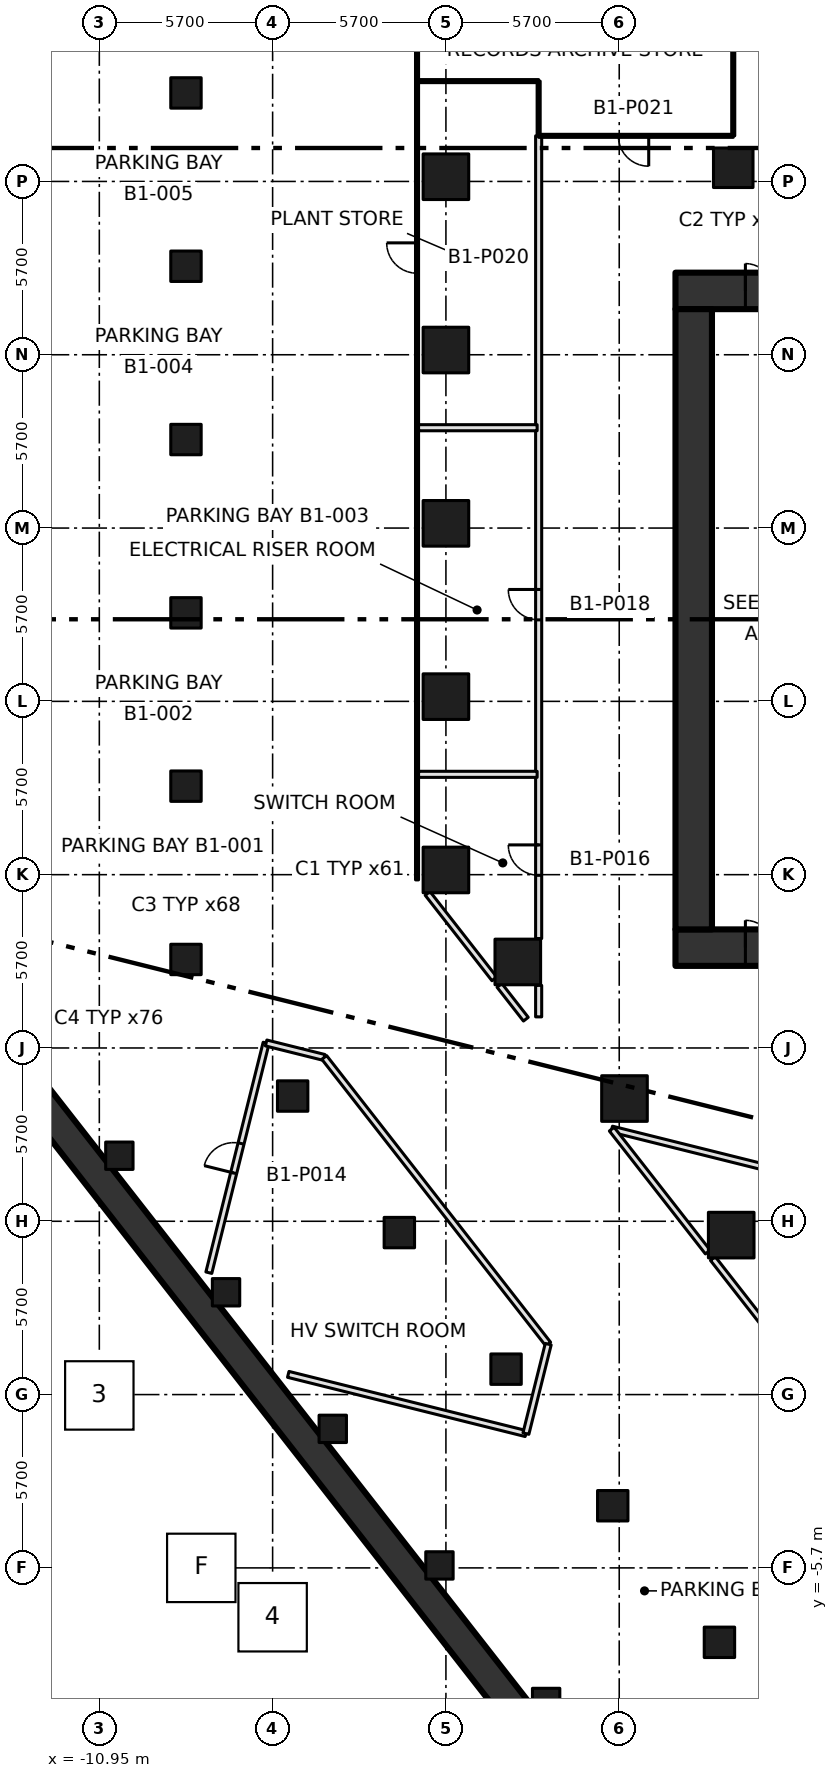
"""IFC4 building model, lengths in metres.
Left out: names, types, materials, properties, quantities, classifications, styles, units other than length and angle.
Written with IfcOpenShell. Run it as: python <this file> out.ifc"""

import sys

from ifc_helpers import new_model, si_unit, direction, frame, frame_2d, origin, origin_2d, place, context, subcontext, project, spatial, rectangle, extrude, element, fill, save


model = new_model("IFC4")
c1 = context("Model", 3, precision=1e-05, world=origin(), true_north=direction((0.0, 1.0)))
c2 = subcontext(c1, "Body", "Model", "MODEL_VIEW")
j1 = project(units=[si_unit("LENGTHUNIT", "METRE"), si_unit("PLANEANGLEUNIT", "RADIAN")], contexts=[c1])
p1 = place(None, origin())
s1 = spatial("IfcSite", under=j1, at=p1, CompositionType="ELEMENT")
p2 = place(p1, origin())
s2 = spatial("IfcBuilding", under=s1, at=p2, CompositionType="ELEMENT")
p3 = place(p2, frame((0.0, 0.0, -4.5)))
s3 = spatial("IfcBuildingStorey", under=s2, at=p3, CompositionType="ELEMENT", Elevation=-4.5)
p4 = place(p3, frame((8.202, -17.356, 0.0), z_axis=(0.0, 0.0, 1.0), x_axis=(-0.615661751898, 0.788010537524, 0.0)))
e1 = element("IfcWall", 1, at=p4, inside=s3, PredefinedType="SOLIDWALL", context=c2, shape_type="SweptSolid", body=[
    extrude(rectangle(XDim=37.452, YDim=1.0, at=frame_2d((18.726, 0.0))), origin(), (0.0, 0.0, 1.0), 4.5),
])
for number, where, z_axis, x_axis in (
    (2, (0.45, 17.255, 0.0), (0.0, 0.0, 1.0), (1.0, 0.0, 0.0)),
    (3, (0.45, 22.955, 0.0), (0.0, 0.0, 1.0), (1.0, 0.0, 0.0)),
    (4, (0.45, 28.655, 0.0), (0.0, 0.0, 1.0), (1.0, 0.0, 0.0)),
    (5, (0.45, 34.355, 0.0), (0.0, 0.0, 1.0), (1.0, 0.0, 0.0)),
    (6, (0.45, 40.055, 0.0), (0.0, 0.0, 1.0), (1.0, 0.0, 0.0)),
    (7, (9.833, 5.245, 0.0), (0.0, 0.0, 1.0), (1.0, 0.0, 0.0)),
    (8, (6.323, 9.737, 0.0), (0.0, 0.0, 1.0), (1.0, 0.0, 0.0)),
    (9, (2.814, 14.229, 0.0), (0.0, 0.0, 1.0), (1.0, 0.0, 0.0)),
):
    element("IfcColumn", number, at=place(p3, frame(where, z_axis=z_axis, x_axis=x_axis)), inside=s3, PredefinedType="COLUMN", context=c2, shape_type="SweptSolid", body=[
        extrude(rectangle(XDim=1.5, YDim=1.5, at=origin_2d()), origin(), (0.0, 0.0, 1.0), 4.5),
    ])
p5 = place(p3, frame((9.9, 40.35, 0.0), z_axis=(0.0, 0.0, 1.0), x_axis=(1.0, 0.0, 0.0)))
e10 = element("IfcColumn", 10, at=p5, inside=s3, PredefinedType="COLUMN", context=c2, shape_type="SweptSolid", body=[
    extrude(rectangle(XDim=1.3, YDim=1.3, at=origin_2d()), origin(), (0.0, 0.0, 1.0), 4.5),
])
for number, where, z_axis, x_axis in (
    (11, (-8.1, 14.311, 0.0), (0.0, 0.0, 1.0), (1.0, 0.0, 0.0)),
    (12, (-8.1, 20.011, 0.0), (0.0, 0.0, 1.0), (1.0, 0.0, 0.0)),
    (13, (-8.1, 25.711, 0.0), (0.0, 0.0, 1.0), (1.0, 0.0, 0.0)),
    (14, (-8.1, 31.411, 0.0), (0.0, 0.0, 1.0), (1.0, 0.0, 0.0)),
    (15, (-8.1, 37.111, 0.0), (0.0, 0.0, 1.0), (1.0, 0.0, 0.0)),
    (16, (-8.1, 42.811, 0.0), (0.0, 0.0, 1.0), (1.0, 0.0, 0.0)),
    (17, (-4.591, 9.819, 0.0), (0.0, 0.0, 1.0), (1.0, 0.0, 0.0)),
    (18, (-1.082, 5.328, 0.0), (0.0, 0.0, 1.0), (1.0, 0.0, 0.0)),
    (19, (2.428, 0.836, 0.0), (0.0, 0.0, 1.0), (1.0, 0.0, 0.0)),
    (20, (5.937, -3.656, 0.0), (0.0, 0.0, 1.0), (1.0, 0.0, 0.0)),
    (21, (9.446, -8.148, 0.0), (0.0, 0.0, 1.0), (1.0, 0.0, 0.0)),
):
    element("IfcColumn", number, at=place(p3, frame(where, z_axis=z_axis, x_axis=x_axis)), inside=s3, PredefinedType="COLUMN", context=c2, shape_type="SweptSolid", body=[
        extrude(rectangle(XDim=1.0, YDim=1.0, at=origin_2d()), origin(), (0.0, 0.0, 1.0), 4.5),
    ])
for number, where, z_axis, x_axis in (
    (22, (-10.291, 7.856, 0.0), (0.0, 0.0, 1.0), (1.0, 0.0, 0.0)),
    (23, (-6.782, 3.365, 0.0), (0.0, 0.0, 1.0), (1.0, 0.0, 0.0)),
    (24, (-3.272, -1.127, 0.0), (0.0, 0.0, 1.0), (1.0, 0.0, 0.0)),
    (25, (0.237, -5.619, 0.0), (0.0, 0.0, 1.0), (1.0, 0.0, 0.0)),
    (26, (3.746, -10.11, 0.0), (0.0, 0.0, 1.0), (1.0, 0.0, 0.0)),
):
    element("IfcColumn", number, at=place(p3, frame(where, z_axis=z_axis, x_axis=x_axis)), inside=s3, PredefinedType="COLUMN", context=c2, shape_type="SweptSolid", body=[
        extrude(rectangle(XDim=0.9, YDim=0.9, at=origin_2d()), origin(), (0.0, 0.0, 1.0), 4.5),
    ])
p6 = place(p3, frame((8.0, 14.7, -0.45), z_axis=(0.0, 0.0, 1.0), x_axis=(1.0, 0.0, 0.0)))
e27 = element("IfcWall", 27, at=p6, inside=s3, PredefinedType="SHEAR", context=c2, shape_type="SweptSolid", body=[
    extrude(rectangle(XDim=22.8, YDim=1.2, at=frame_2d((11.4, 0.0))), origin(), (0.0, 0.0, 1.0), 4.5),
])
p7 = place(p6, frame((2.3, 0.0, 0.45)))
e28 = element("IfcOpeningElement", 28, at=p7, cuts=e27, PredefinedType="OPENING", context=c2, shape_type="SweptSolid", body=[
    extrude(rectangle(XDim=1.8, YDim=2.1, at=frame_2d((0.9, 1.05))), frame((0.0, 0.61, 0.0), z_axis=(0.0, -1.0, 0.0), x_axis=(1.0, 0.0, 0.0)), (0.0, 0.0, 1.0), 1.22),
])
p8 = place(p3, frame((8.0, 36.3, -0.45), z_axis=(0.0, 0.0, 1.0), x_axis=(1.0, 0.0, 0.0)))
e29 = element("IfcWall", 29, at=p8, inside=s3, PredefinedType="SHEAR", context=c2, shape_type="SweptSolid", body=[
    extrude(rectangle(XDim=22.8, YDim=1.2, at=frame_2d((11.4, 0.0))), origin(), (0.0, 0.0, 1.0), 4.5),
])
p9 = place(p8, frame((2.3, 0.0, 0.45)))
e30 = element("IfcOpeningElement", 30, at=p9, cuts=e29, PredefinedType="OPENING", context=c2, shape_type="SweptSolid", body=[
    extrude(rectangle(XDim=1.8, YDim=2.1, at=frame_2d((0.9, 1.05))), frame((0.0, 0.61, 0.0), z_axis=(0.0, -1.0, 0.0), x_axis=(1.0, 0.0, 0.0)), (0.0, 0.0, 1.0), 1.22),
])
p10 = place(p3, frame((8.6, 15.3, -0.45), z_axis=(0.0, 0.0, 1.0), x_axis=(0.0, 1.0, 0.0)))
e31 = element("IfcWall", 31, at=p10, inside=s3, PredefinedType="SHEAR", context=c2, shape_type="SweptSolid", body=[
    extrude(rectangle(XDim=20.4, YDim=1.2, at=frame_2d((10.2, 0.0))), origin(), (0.0, 0.0, 1.0), 4.5),
])
p11 = place(p3, frame((-7.348, 4.009, 0.0), z_axis=(0.0, 0.0, 1.0), x_axis=(0.24190854342, 0.970299055251, 0.0)))
e32 = element("IfcWall", 32, at=p11, inside=s3, PredefinedType="PARTITIONING", context=c2, shape_type="SweptSolid", body=[
    extrude(rectangle(XDim=7.787, YDim=0.2, at=frame_2d((3.894, 0.0))), origin(), (0.0, 0.0, 1.0), 4.05),
])
p12 = place(p11, frame((3.38, 0.0, 0.0)))
e33 = element("IfcOpeningElement", 33, at=p12, cuts=e32, PredefinedType="OPENING", context=c2, shape_type="SweptSolid", body=[
    extrude(rectangle(XDim=1.0, YDim=2.1, at=frame_2d((0.5, 1.05))), frame((0.0, 0.11, 0.0), z_axis=(0.0, -1.0, 0.0), x_axis=(1.0, 0.0, 0.0)), (0.0, 0.0, 1.0), 0.22),
])
p13 = place(p3, frame((-5.464, 11.565, 0.0), z_axis=(0.0, 0.0, 1.0), x_axis=(0.970258984685, -0.242069210428, 0.0)))
e34 = element("IfcWall", 34, at=p13, inside=s3, PredefinedType="PARTITIONING", context=c2, shape_type="SweptSolid", body=[
    extrude(rectangle(XDim=1.971, YDim=0.2, at=frame_2d((0.985, 0.0))), origin(), (0.0, 0.0, 1.0), 4.05),
])
p14 = place(p3, frame((-3.552, 11.088, 0.0), z_axis=(0.0, 0.0, 1.0), x_axis=(0.61567373726, -0.78800117338, 0.0)))
e35 = element("IfcWall", 35, at=p14, inside=s3, PredefinedType="PARTITIONING", context=c2, shape_type="SweptSolid", body=[
    extrude(rectangle(XDim=11.966, YDim=0.2, at=frame_2d((5.983, 0.0))), origin(), (0.0, 0.0, 1.0), 4.05),
])
p15 = place(p3, frame((-0.5, 16.928, 0.0), z_axis=(0.0, 0.0, 1.0), x_axis=(0.0, 1.0, 0.0)))
e36 = element("IfcWall", 36, at=p15, inside=s3, PredefinedType="PARTITIONING", context=c2, shape_type="SweptSolid", body=[
    extrude(rectangle(XDim=30.072, YDim=0.1, at=frame_2d((15.036, 0.0))), origin(), (0.0, 0.0, 1.0), 4.05),
])
p16 = place(p15, frame((19.952, 0.0, 0.0)))
e37 = element("IfcOpeningElement", 37, at=p16, cuts=e36, PredefinedType="OPENING", context=c2, shape_type="SweptSolid", body=[
    extrude(rectangle(XDim=1.0, YDim=2.1, at=frame_2d((0.5, 1.05))), frame((0.0, 0.06, 0.0), z_axis=(0.0, -1.0, 0.0), x_axis=(1.0, 0.0, 0.0)), (0.0, 0.0, 1.0), 0.12),
])
p17 = place(p3, frame((2.044, 13.672, 0.0), z_axis=(0.0, 0.0, 1.0), x_axis=(-0.615705088294, 0.787976677477, 0.0)))
e38 = element("IfcWall", 38, at=p17, inside=s3, PredefinedType="PARTITIONING", context=c2, shape_type="SweptSolid", body=[
    extrude(rectangle(XDim=3.57, YDim=0.2, at=frame_2d((1.785, 0.0))), origin(), (0.0, 0.0, 1.0), 4.05),
])
p18 = place(p3, frame((3.081, -1.283, 0.0), z_axis=(0.0, 0.0, 1.0), x_axis=(-0.970325832903, 0.241801112487, 0.0)))
e39 = element("IfcWall", 39, at=p18, inside=s3, PredefinedType="PARTITIONING", context=c2, shape_type="SweptSolid", body=[
    extrude(rectangle(XDim=8.056, YDim=0.2, at=frame_2d((4.028, 0.0))), origin(), (0.0, 0.0, 1.0), 4.05),
])
p19 = place(p3, frame((3.079, 12.347, 0.0), z_axis=(0.0, 0.0, 1.0), x_axis=(-0.61579508321, 0.787906349444, 0.0)))
e40 = element("IfcWall", 40, at=p19, inside=s3, PredefinedType="PARTITIONING", context=c2, shape_type="SweptSolid", body=[
    extrude(rectangle(XDim=1.411, YDim=0.2, at=frame_2d((0.706, 0.0))), origin(), (0.0, 0.0, 1.0), 4.05),
])
p20 = place(p3, frame((3.5, 13.459, 0.0), z_axis=(0.0, 0.0, 1.0), x_axis=(0.0, -1.0, 0.0)))
e41 = element("IfcWall", 41, at=p20, inside=s3, PredefinedType="PARTITIONING", context=c2, shape_type="SweptSolid", body=[
    extrude(rectangle(XDim=1.036, YDim=0.2, at=frame_2d((0.518, 0.0))), origin(), (0.0, 0.0, 1.0), 4.05),
])
p21 = place(p3, frame((3.5, 14.999, 0.0), z_axis=(0.0, 0.0, 1.0), x_axis=(0.0, 1.0, 0.0)))
e42 = element("IfcWall", 42, at=p21, inside=s3, PredefinedType="PARTITIONING", context=c2, shape_type="SweptSolid", body=[
    extrude(rectangle(XDim=26.401, YDim=0.2, at=frame_2d((13.2, 0.0))), origin(), (0.0, 0.0, 1.0), 4.05),
])
p22 = place(p21, frame((2.08, 0.0, 0.0)))
e43 = element("IfcOpeningElement", 43, at=p22, cuts=e42, PredefinedType="OPENING", context=c2, shape_type="SweptSolid", body=[
    extrude(rectangle(XDim=1.0, YDim=2.1, at=frame_2d((0.5, 1.05))), frame((0.0, 0.11, 0.0), z_axis=(0.0, -1.0, 0.0), x_axis=(1.0, 0.0, 0.0)), (0.0, 0.0, 1.0), 0.22),
])
p23 = place(p21, frame((10.481, 0.0, 0.0)))
e44 = element("IfcOpeningElement", 44, at=p23, cuts=e42, PredefinedType="OPENING", context=c2, shape_type="SweptSolid", body=[
    extrude(rectangle(XDim=1.0, YDim=2.1, at=frame_2d((0.5, 1.05))), frame((0.0, 0.11, 0.0), z_axis=(0.0, -1.0, 0.0), x_axis=(1.0, 0.0, 0.0)), (0.0, 0.0, 1.0), 0.22),
])
p24 = place(p3, frame((3.815, 1.659, 0.0), z_axis=(0.0, 0.0, 1.0), x_axis=(-0.242043001073, -0.970265523262, 0.0)))
e45 = element("IfcWall", 45, at=p24, inside=s3, PredefinedType="PARTITIONING", context=c2, shape_type="SweptSolid", body=[
    extrude(rectangle(XDim=3.032, YDim=0.2, at=frame_2d((1.516, 0.0))), origin(), (0.0, 0.0, 1.0), 4.05),
])
p25 = place(p3, frame((5.904, 8.731, 0.0), z_axis=(0.0, 0.0, 1.0), x_axis=(0.970295210336, -0.241923964912, 0.0)))
e46 = element("IfcWall", 46, at=p25, inside=s3, PredefinedType="PARTITIONING", context=c2, shape_type="SweptSolid", body=[
    extrude(rectangle(XDim=13.243, YDim=0.2, at=frame_2d((6.622, 0.0))), origin(), (0.0, 0.0, 1.0), 4.05),
])
p26 = place(p3, frame((9.063, 4.688, 0.0), z_axis=(0.0, 0.0, 1.0), x_axis=(-0.615688364166, 0.787989745003, 0.0)))
e47 = element("IfcWall", 47, at=p26, inside=s3, PredefinedType="PARTITIONING", context=c2, shape_type="SweptSolid", body=[
    extrude(rectangle(XDim=5.131, YDim=0.2, at=frame_2d((2.565, 0.0))), origin(), (0.0, 0.0, 1.0), 4.05),
])
p27 = place(p3, frame((9.9, 41.4, 0.0), z_axis=(0.0, 0.0, 1.0), x_axis=(-1.0, 0.0, 0.0)))
e48 = element("IfcWall", 48, at=p27, inside=s3, PredefinedType="PARTITIONING", context=c2, shape_type="SweptSolid", body=[
    extrude(rectangle(XDim=6.4, YDim=0.1, at=frame_2d((3.2, 0.0))), origin(), (0.0, 0.0, 1.0), 4.05),
])
p28 = place(p27, frame((2.78, 0.0, 0.0)))
e49 = element("IfcOpeningElement", 49, at=p28, cuts=e48, PredefinedType="OPENING", context=c2, shape_type="SweptSolid", body=[
    extrude(rectangle(XDim=1.0, YDim=2.1, at=frame_2d((0.5, 1.05))), frame((0.0, 0.06, 0.0), z_axis=(0.0, -1.0, 0.0), x_axis=(1.0, 0.0, 0.0)), (0.0, 0.0, 1.0), 0.12),
])
p29 = place(p3, frame((9.9, 45.38, 0.0), z_axis=(0.0, 0.0, 1.0), x_axis=(0.0, -1.0, 0.0)))
e50 = element("IfcWall", 50, at=p29, inside=s3, PredefinedType="PARTITIONING", context=c2, shape_type="SweptSolid", body=[
    extrude(rectangle(XDim=3.98, YDim=0.1, at=frame_2d((1.99, 0.0))), origin(), (0.0, 0.0, 1.0), 4.05),
])
p30 = place(p3, frame((12.572, 0.197, 0.0), z_axis=(0.0, 0.0, 1.0), x_axis=(-0.615732172214, 0.787955514037, 0.0)))
e51 = element("IfcWall", 51, at=p30, inside=s3, PredefinedType="PARTITIONING", context=c2, shape_type="SweptSolid", body=[
    extrude(rectangle(XDim=5.429, YDim=0.2, at=frame_2d((2.715, 0.0))), origin(), (0.0, 0.0, 1.0), 4.05),
])
p31 = place(p3, frame((-0.45, 43.2, 0.0), z_axis=(0.0, 0.0, 1.0), x_axis=(1.0, 0.0, 0.0)))
e52 = element("IfcWall", 52, at=p31, inside=s3, PredefinedType="PARTITIONING", context=c2, shape_type="SweptSolid", body=[
    extrude(rectangle(XDim=3.95, YDim=0.1, at=frame_2d((1.975, 0.0))), origin(), (0.0, 0.0, 1.0), 4.05),
])
for number, where, z_axis, x_axis in (
    (53, (3.45, 20.4, 0.0), (0.0, 0.0, 1.0), (-1.0, 0.0, 0.0)),
    (54, (3.45, 31.8, 0.0), (0.0, 0.0, 1.0), (-1.0, 0.0, 0.0)),
):
    element("IfcWall", number, at=place(p3, frame(where, z_axis=z_axis, x_axis=x_axis)), inside=s3, PredefinedType="PARTITIONING", context=c2, shape_type="SweptSolid", body=[
        extrude(rectangle(XDim=3.9, YDim=0.2, at=frame_2d((1.95, 0.0))), origin(), (0.0, 0.0, 1.0), 4.05),
    ])
p32 = place(p3, frame((3.5, 43.2, 0.0), z_axis=(0.0, 0.0, 1.0), x_axis=(0.0, -1.0, 0.0)))
e55 = element("IfcWall", 55, at=p32, inside=s3, PredefinedType="PARTITIONING", context=c2, shape_type="SweptSolid", body=[
    extrude(rectangle(XDim=1.804, YDim=0.1, at=frame_2d((0.902, 0.0))), origin(), (0.0, 0.0, 1.0), 4.05),
])
p33 = place(p9, origin())
e56 = element("IfcDoor", 56, at=p33, inside=s3, OperationType="DOUBLE_DOOR_SINGLE_SWING", PredefinedType="DOOR", context=c2, shape_type="SweptSolid", body=[
    extrude(rectangle(XDim=1.8, YDim=2.1, at=frame_2d((0.9, 1.05))), frame((0.0, 0.025, 0.0), z_axis=(0.0, -1.0, 0.0), x_axis=(1.0, 0.0, 0.0)), (0.0, 0.0, 1.0), 0.05),
])
fill(e30, e56)
p34 = place(p7, origin())
e57 = element("IfcDoor", 57, at=p34, inside=s3, OperationType="DOUBLE_DOOR_SINGLE_SWING", PredefinedType="DOOR", context=c2, shape_type="SweptSolid", body=[
    extrude(rectangle(XDim=1.8, YDim=2.1, at=frame_2d((0.9, 1.05))), frame((0.0, 0.025, 0.0), z_axis=(0.0, -1.0, 0.0), x_axis=(1.0, 0.0, 0.0)), (0.0, 0.0, 1.0), 0.05),
])
fill(e28, e57)
p35 = place(p12, origin())
e58 = element("IfcDoor", 58, at=p35, inside=s3, OperationType="SINGLE_SWING_LEFT", PredefinedType="DOOR", context=c2, shape_type="SweptSolid", body=[
    extrude(rectangle(XDim=1.0, YDim=2.1, at=frame_2d((0.5, 1.05))), frame((0.0, 0.025, 0.0), z_axis=(0.0, -1.0, 0.0), x_axis=(1.0, 0.0, 0.0)), (0.0, 0.0, 1.0), 0.05),
])
fill(e33, e58)
p36 = place(p22, origin())
e59 = element("IfcDoor", 59, at=p36, inside=s3, OperationType="SINGLE_SWING_RIGHT", PredefinedType="DOOR", context=c2, shape_type="SweptSolid", body=[
    extrude(rectangle(XDim=1.0, YDim=2.1, at=frame_2d((0.5, 1.05))), frame((0.0, 0.025, 0.0), z_axis=(0.0, -1.0, 0.0), x_axis=(1.0, 0.0, 0.0)), (0.0, 0.0, 1.0), 0.05),
])
fill(e43, e59)
p37 = place(p23, origin())
e60 = element("IfcDoor", 60, at=p37, inside=s3, OperationType="SINGLE_SWING_RIGHT", PredefinedType="DOOR", context=c2, shape_type="SweptSolid", body=[
    extrude(rectangle(XDim=1.0, YDim=2.1, at=frame_2d((0.5, 1.05))), frame((0.0, 0.025, 0.0), z_axis=(0.0, -1.0, 0.0), x_axis=(1.0, 0.0, 0.0)), (0.0, 0.0, 1.0), 0.05),
])
fill(e44, e60)
p38 = place(p16, origin())
e61 = element("IfcDoor", 61, at=p38, inside=s3, OperationType="SINGLE_SWING_RIGHT", PredefinedType="DOOR", context=c2, shape_type="SweptSolid", body=[
    extrude(rectangle(XDim=1.0, YDim=2.1, at=frame_2d((0.5, 1.05))), frame((0.0, 0.025, 0.0), z_axis=(0.0, -1.0, 0.0), x_axis=(1.0, 0.0, 0.0)), (0.0, 0.0, 1.0), 0.05),
])
fill(e37, e61)
p39 = place(p28, origin())
e62 = element("IfcDoor", 62, at=p39, inside=s3, OperationType="SINGLE_SWING_LEFT", PredefinedType="DOOR", context=c2, shape_type="SweptSolid", body=[
    extrude(rectangle(XDim=1.0, YDim=2.1, at=frame_2d((0.5, 1.05))), frame((0.0, 0.025, 0.0), z_axis=(0.0, -1.0, 0.0), x_axis=(1.0, 0.0, 0.0)), (0.0, 0.0, 1.0), 0.05),
])
fill(e49, e62)
save(model, sys.argv[1])
